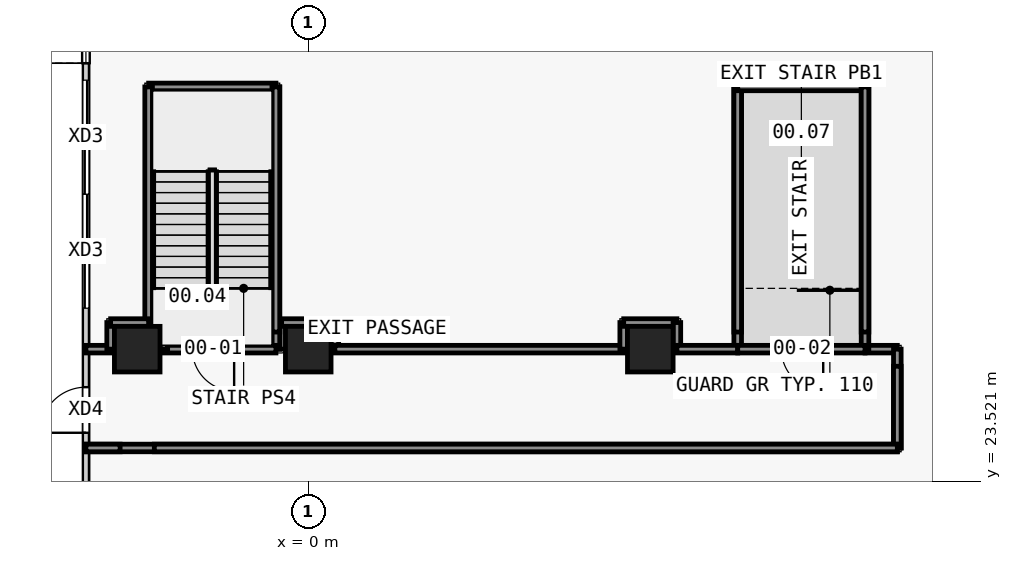
"""IFC4 building model, lengths in metres.
Left out: names, types, materials, properties, quantities, classifications, styles, units other than length and angle.
Written with IfcOpenShell. Run it as: python <this file> out.ifc"""

import sys

from ifc_helpers import new_model, si_unit, direction, frame, frame_2d, origin, origin_2d, place, context, subcontext, project, spatial, rectangle, extrude, element, fill, save


model = new_model("IFC4")
c1 = context("Model", 3, precision=1e-05, world=origin(), true_north=direction((0.0, 1.0)))
c2 = subcontext(c1, "Body", "Model", "MODEL_VIEW")
j1 = project(units=[si_unit("LENGTHUNIT", "METRE"), si_unit("PLANEANGLEUNIT", "RADIAN")], contexts=[c1])
p1 = place(None, origin())
s1 = spatial("IfcSite", under=j1, at=p1, CompositionType="ELEMENT")
p2 = place(p1, origin())
s2 = spatial("IfcBuilding", under=s1, at=p2, CompositionType="ELEMENT")
p3 = place(p2, origin())
s3 = spatial("IfcBuildingStorey", under=s2, at=p3, CompositionType="ELEMENT", Elevation=0.0)
for number, where, z_axis, x_axis in (
    (1, (-4.5, 27.0, 0.0), (0.0, 0.0, 1.0), (1.0, 0.0, 0.0)),
    (2, (0.0, 27.0, 0.0), (0.0, 0.0, 1.0), (1.0, 0.0, 0.0)),
    (3, (9.0, 27.0, 0.0), (0.0, 0.0, 1.0), (1.0, 0.0, 0.0)),
):
    element("IfcColumn", number, at=place(p3, frame(where, z_axis=z_axis, x_axis=x_axis)), inside=s3, PredefinedType="COLUMN", context=c2, shape_type="SweptSolid", body=[
        extrude(rectangle(XDim=1.2, YDim=1.2, at=origin_2d()), origin(), (0.0, 0.0, 1.0), 8.0),
    ])
p4 = place(p3, frame((-5.85, 21.13, 0.0), z_axis=(0.0, 0.0, 1.0), x_axis=(0.0, 1.0, 0.0)))
e4 = element("IfcWall", 4, at=p4, inside=s3, PredefinedType="STANDARD", context=c2, shape_type="SweptSolid", body=[
    extrude(rectangle(XDim=13.395, YDim=0.16, at=frame_2d((6.698, 0.0))), origin(), (0.0, 0.0, 1.0), 7.65),
])
p5 = place(p4, frame((6.948, 0.0, 0.0)))
e5 = element("IfcOpeningElement", 5, at=p5, cuts=e4, PredefinedType="OPENING", context=c2, shape_type="SweptSolid", body=[
    extrude(rectangle(XDim=3.0, YDim=3.0, at=frame_2d((1.5, 1.5))), frame((0.0, 0.09, 0.0), z_axis=(0.0, -1.0, 0.0), x_axis=(1.0, 0.0, 0.0)), (0.0, 0.0, 1.0), 0.18),
])
p6 = place(p4, frame((9.948, 0.0, 0.0)))
e6 = element("IfcOpeningElement", 6, at=p6, cuts=e4, PredefinedType="OPENING", context=c2, shape_type="SweptSolid", body=[
    extrude(rectangle(XDim=3.0, YDim=3.0, at=frame_2d((1.5, 1.5))), frame((0.0, 0.09, 0.0), z_axis=(0.0, -1.0, 0.0), x_axis=(1.0, 0.0, 0.0)), (0.0, 0.0, 1.0), 0.18),
])
p7 = place(p4, frame((3.67, 0.0, 0.0)))
e7 = element("IfcOpeningElement", 7, at=p7, cuts=e4, PredefinedType="OPENING", context=c2, shape_type="SweptSolid", body=[
    extrude(rectangle(XDim=1.2, YDim=2.4, at=frame_2d((0.6, 1.2))), frame((0.0, 0.09, 0.0), z_axis=(0.0, -1.0, 0.0), x_axis=(1.0, 0.0, 0.0)), (0.0, 0.0, 1.0), 0.18),
])
p8 = place(p3, frame((14.65, 27.0, 0.0), z_axis=(0.0, 0.0, 1.0), x_axis=(1.0, 0.0, 0.0)))
e8 = element("IfcWall", 8, at=p8, inside=s3, PredefinedType="PARTITIONING", context=c2, shape_type="SweptSolid", body=[
    extrude(rectangle(XDim=0.85, YDim=0.2, at=frame_2d((0.425, 0.0))), origin(), (0.0, 0.0, 1.0), 6.95),
])
p9 = place(p3, frame((15.5, 27.0, 0.0), z_axis=(0.0, 0.0, 1.0), x_axis=(0.0, -1.0, 0.0)))
e9 = element("IfcWall", 9, at=p9, inside=s3, PredefinedType="PARTITIONING", context=c2, shape_type="SweptSolid", body=[
    extrude(rectangle(XDim=2.6, YDim=0.2, at=frame_2d((1.3, 0.0))), origin(), (0.0, 0.0, 1.0), 6.95),
])
p10 = place(p3, frame((15.5, 24.4, 0.0), z_axis=(0.0, 0.0, 1.0), x_axis=(-1.0, 0.0, 0.0)))
e10 = element("IfcWall", 10, at=p10, inside=s3, PredefinedType="PARTITIONING", context=c2, shape_type="SweptSolid", body=[
    extrude(rectangle(XDim=21.35, YDim=0.2, at=frame_2d((10.675, 0.0))), origin(), (0.0, 0.0, 1.0), 6.95),
])
p11 = place(p3, frame((11.3, 27.0, 0.0), z_axis=(0.0, 0.0, 1.0), x_axis=(0.0, 1.0, 0.0)))
e11 = element("IfcWall", 11, at=p11, inside=s3, PredefinedType="PARTITIONING", context=c2, shape_type="SweptSolid", body=[
    extrude(rectangle(XDim=6.9, YDim=0.2, at=frame_2d((3.45, 0.0))), origin(), (0.0, 0.0, 1.0), 6.95),
])
p12 = place(p3, frame((11.3, 33.9, 0.0), z_axis=(0.0, 0.0, 1.0), x_axis=(1.0, 0.0, 0.0)))
e12 = element("IfcWall", 12, at=p12, inside=s3, PredefinedType="PARTITIONING", context=c2, shape_type="SweptSolid", body=[
    extrude(rectangle(XDim=3.35, YDim=0.2, at=frame_2d((1.675, 0.0))), origin(), (0.0, 0.0, 1.0), 7.65),
])
p13 = place(p3, frame((14.65, 33.9, 0.0), z_axis=(0.0, 0.0, 1.0), x_axis=(0.0, -1.0, 0.0)))
e13 = element("IfcWall", 13, at=p13, inside=s3, PredefinedType="PARTITIONING", context=c2, shape_type="SweptSolid", body=[
    extrude(rectangle(XDim=6.9, YDim=0.2, at=frame_2d((3.45, 0.0))), origin(), (0.0, 0.0, 1.0), 6.95),
])
p14 = place(p3, frame((-0.65, 27.0, 0.0), z_axis=(0.0, 0.0, 1.0), x_axis=(0.0, 1.0, 0.0)))
e14 = element("IfcWall", 14, at=p14, inside=s3, PredefinedType="PARTITIONING", context=c2, shape_type="SweptSolid", body=[
    extrude(rectangle(XDim=0.7, YDim=0.2, at=frame_2d((0.35, 0.0))), origin(), (0.0, 0.0, 1.0), 6.95),
])
p15 = place(p3, frame((-0.7, 27.7, 0.0), z_axis=(0.0, 0.0, 1.0), x_axis=(1.0, 0.0, 0.0)))
e15 = element("IfcWall", 15, at=p15, inside=s3, PredefinedType="PARTITIONING", context=c2, shape_type="SweptSolid", body=[
    extrude(rectangle(XDim=1.4, YDim=0.2, at=frame_2d((0.7, 0.0))), origin(), (0.0, 0.0, 1.0), 6.95),
])
p16 = place(p3, frame((0.7, 27.7, 0.0), z_axis=(0.0, 0.0, 1.0), x_axis=(0.0, -1.0, 0.0)))
e16 = element("IfcWall", 16, at=p16, inside=s3, PredefinedType="PARTITIONING", context=c2, shape_type="SweptSolid", body=[
    extrude(rectangle(XDim=0.7, YDim=0.2, at=frame_2d((0.35, 0.0))), origin(), (0.0, 0.0, 1.0), 6.95),
])
p17 = place(p3, frame((0.7, 27.0, 0.0), z_axis=(0.0, 0.0, 1.0), x_axis=(1.0, 0.0, 0.0)))
e17 = element("IfcWall", 17, at=p17, inside=s3, PredefinedType="PARTITIONING", context=c2, shape_type="SweptSolid", body=[
    extrude(rectangle(XDim=7.6, YDim=0.2, at=frame_2d((3.8, 0.0))), origin(), (0.0, 0.0, 1.0), 6.95),
])
p18 = place(p3, frame((8.3, 27.0, 0.0), z_axis=(0.0, 0.0, 1.0), x_axis=(0.0, 1.0, 0.0)))
e18 = element("IfcWall", 18, at=p18, inside=s3, PredefinedType="PARTITIONING", context=c2, shape_type="SweptSolid", body=[
    extrude(rectangle(XDim=0.7, YDim=0.2, at=frame_2d((0.35, 0.0))), origin(), (0.0, 0.0, 1.0), 6.95),
])
p19 = place(p3, frame((8.3, 27.7, 0.0), z_axis=(0.0, 0.0, 1.0), x_axis=(1.0, 0.0, 0.0)))
e19 = element("IfcWall", 19, at=p19, inside=s3, PredefinedType="PARTITIONING", context=c2, shape_type="SweptSolid", body=[
    extrude(rectangle(XDim=1.4, YDim=0.2, at=frame_2d((0.7, 0.0))), origin(), (0.0, 0.0, 1.0), 6.95),
])
p20 = place(p3, frame((9.7, 27.7, 0.0), z_axis=(0.0, 0.0, 1.0), x_axis=(0.0, -1.0, 0.0)))
e20 = element("IfcWall", 20, at=p20, inside=s3, PredefinedType="PARTITIONING", context=c2, shape_type="SweptSolid", body=[
    extrude(rectangle(XDim=0.7, YDim=0.2, at=frame_2d((0.35, 0.0))), origin(), (0.0, 0.0, 1.0), 6.95),
])
p21 = place(p3, frame((9.7, 27.0, 0.0), z_axis=(0.0, 0.0, 1.0), x_axis=(1.0, 0.0, 0.0)))
e21 = element("IfcWall", 21, at=p21, inside=s3, PredefinedType="PARTITIONING", context=c2, shape_type="SweptSolid", body=[
    extrude(rectangle(XDim=1.6, YDim=0.2, at=frame_2d((0.8, 0.0))), origin(), (0.0, 0.0, 1.0), 6.95),
])
p22 = place(p3, frame((-4.2, 33.9, 0.0), z_axis=(0.0, 0.0, 1.0), x_axis=(1.0, 0.0, 0.0)))
e22 = element("IfcWall", 22, at=p22, inside=s3, PredefinedType="PARTITIONING", context=c2, shape_type="SweptSolid", body=[
    extrude(rectangle(XDim=3.35, YDim=0.2, at=frame_2d((1.675, 0.0))), origin(), (0.0, 0.0, 1.0), 7.65),
])
p23 = place(p3, frame((-0.85, 33.9, 0.0), z_axis=(0.0, 0.0, 1.0), x_axis=(0.0, -1.0, 0.0)))
e23 = element("IfcWall", 23, at=p23, inside=s3, PredefinedType="PARTITIONING", context=c2, shape_type="SweptSolid", body=[
    extrude(rectangle(XDim=6.9, YDim=0.2, at=frame_2d((3.45, 0.0))), origin(), (0.0, 0.0, 1.0), 6.95),
])
p24 = place(p3, frame((-4.2, 27.7, 0.0), z_axis=(0.0, 0.0, 1.0), x_axis=(0.0, 1.0, 0.0)))
e24 = element("IfcWall", 24, at=p24, inside=s3, PredefinedType="PARTITIONING", context=c2, shape_type="SweptSolid", body=[
    extrude(rectangle(XDim=6.2, YDim=0.2, at=frame_2d((3.1, 0.0))), origin(), (0.0, 0.0, 1.0), 7.65),
])
p25 = place(p3, frame((-0.85, 27.0, 0.0), z_axis=(0.0, 0.0, 1.0), x_axis=(-1.0, 0.0, 0.0)))
e25 = element("IfcWall", 25, at=p25, inside=s3, PredefinedType="PARTITIONING", context=c2, shape_type="SweptSolid", body=[
    extrude(rectangle(XDim=2.95, YDim=0.2, at=frame_2d((1.475, 0.0))), origin(), (0.0, 0.0, 1.0), 6.95),
])
p26 = place(p25, frame((1.1, 0.0, 0.0)))
e26 = element("IfcOpeningElement", 26, at=p26, cuts=e25, PredefinedType="OPENING", context=c2, shape_type="SweptSolid", body=[
    extrude(rectangle(XDim=1.1, YDim=2.1, at=frame_2d((0.55, 1.05))), frame((0.0, 0.11, 0.0), z_axis=(0.0, -1.0, 0.0), x_axis=(1.0, 0.0, 0.0)), (0.0, 0.0, 1.0), 0.22),
])
p27 = place(p3, frame((-3.8, 27.0, 0.0), z_axis=(0.0, 0.0, 1.0), x_axis=(0.0, 1.0, 0.0)))
e27 = element("IfcWall", 27, at=p27, inside=s3, PredefinedType="PARTITIONING", context=c2, shape_type="SweptSolid", body=[
    extrude(rectangle(XDim=0.7, YDim=0.2, at=frame_2d((0.35, 0.0))), origin(), (0.0, 0.0, 1.0), 6.95),
])
p28 = place(p3, frame((14.65, 27.0, 0.0), z_axis=(0.0, 0.0, 1.0), x_axis=(-1.0, 0.0, 0.0)))
e28 = element("IfcWall", 28, at=p28, inside=s3, PredefinedType="PARTITIONING", context=c2, shape_type="SweptSolid", body=[
    extrude(rectangle(XDim=3.35, YDim=0.2, at=frame_2d((1.675, 0.0))), origin(), (0.0, 0.0, 1.0), 6.95),
])
p29 = place(p28, frame((1.1, 0.0, 0.0)))
e29 = element("IfcOpeningElement", 29, at=p29, cuts=e28, PredefinedType="OPENING", context=c2, shape_type="SweptSolid", body=[
    extrude(rectangle(XDim=1.1, YDim=2.1, at=frame_2d((0.55, 1.05))), frame((0.0, 0.11, 0.0), z_axis=(0.0, -1.0, 0.0), x_axis=(1.0, 0.0, 0.0)), (0.0, 0.0, 1.0), 0.22),
])
p30 = place(p3, frame((-5.85, 27.0, 0.0), z_axis=(0.0, 0.0, 1.0), x_axis=(1.0, 0.0, 0.0)))
e30 = element("IfcWall", 30, at=p30, inside=s3, PredefinedType="PARTITIONING", context=c2, shape_type="SweptSolid", body=[
    extrude(rectangle(XDim=0.65, YDim=0.2, at=frame_2d((0.325, 0.0))), origin(), (0.0, 0.0, 1.0), 7.65),
])
p31 = place(p3, frame((-5.2, 27.0, 0.0), z_axis=(0.0, 0.0, 1.0), x_axis=(0.0, 1.0, 0.0)))
e31 = element("IfcWall", 31, at=p31, inside=s3, PredefinedType="PARTITIONING", context=c2, shape_type="SweptSolid", body=[
    extrude(rectangle(XDim=0.7, YDim=0.2, at=frame_2d((0.35, 0.0))), origin(), (0.0, 0.0, 1.0), 7.65),
])
p32 = place(p3, frame((-5.2, 27.7, 0.0), z_axis=(0.0, 0.0, 1.0), x_axis=(1.0, 0.0, 0.0)))
e32 = element("IfcWall", 32, at=p32, inside=s3, PredefinedType="PARTITIONING", context=c2, shape_type="SweptSolid", body=[
    extrude(rectangle(XDim=1.0, YDim=0.2, at=frame_2d((0.5, 0.0))), origin(), (0.0, 0.0, 1.0), 7.65),
])
p33 = place(p3, frame((15.5, 26.55, 6.95), z_axis=(0.0, 0.0, 1.0), x_axis=(0.0, -1.0, 0.0)))
e33 = element("IfcWall", 33, at=p33, inside=s3, PredefinedType="PARTITIONING", context=c2, shape_type="SweptSolid", body=[
    extrude(rectangle(XDim=2.15, YDim=0.2, at=frame_2d((1.075, 0.0))), origin(), (0.0, 0.0, 1.0), 0.7),
])
p34 = place(p3, frame((15.5, 24.4, 6.95), z_axis=(0.0, 0.0, 1.0), x_axis=(-1.0, 0.0, 0.0)))
e34 = element("IfcWall", 34, at=p34, inside=s3, PredefinedType="PARTITIONING", context=c2, shape_type="SweptSolid", body=[
    extrude(rectangle(XDim=19.55, YDim=0.2, at=frame_2d((9.775, 0.0))), origin(), (0.0, 0.0, 1.0), 0.7),
])
p35 = place(p3, frame((-4.95, 24.4, 6.95), z_axis=(0.0, 0.0, 1.0), x_axis=(-1.0, 0.0, 0.0)))
e35 = element("IfcWall", 35, at=p35, inside=s3, PredefinedType="PARTITIONING", context=c2, shape_type="SweptSolid", body=[
    extrude(rectangle(XDim=0.9, YDim=0.2, at=frame_2d((0.45, 0.0))), origin(), (0.0, 0.0, 1.0), 0.7),
])
for number, where, z_axis, x_axis in (
    (36, (11.3, 27.45, 6.95), (0.0, 0.0, 1.0), (0.0, 1.0, 0.0)),
    (37, (14.65, 33.9, 6.95), (0.0, 0.0, 1.0), (0.0, -1.0, 0.0)),
    (38, (-0.85, 33.9, 6.95), (0.0, 0.0, 1.0), (0.0, -1.0, 0.0)),
):
    element("IfcWall", number, at=place(p3, frame(where, z_axis=z_axis, x_axis=x_axis)), inside=s3, PredefinedType="PARTITIONING", context=c2, shape_type="SweptSolid", body=[
        extrude(rectangle(XDim=6.45, YDim=0.2, at=frame_2d((3.225, 0.0))), origin(), (0.0, 0.0, 1.0), 0.7),
    ])
p36 = place(p5, origin())
e39 = element("IfcDoor", 39, at=p36, inside=s3, OperationType="SINGLE_SWING_LEFT", PredefinedType="DOOR", context=c2, shape_type="SweptSolid", body=[
    extrude(rectangle(XDim=3.0, YDim=3.0, at=frame_2d((1.5, 1.5))), frame((0.0, 0.025, 0.0), z_axis=(0.0, -1.0, 0.0), x_axis=(1.0, 0.0, 0.0)), (0.0, 0.0, 1.0), 0.05),
])
fill(e5, e39)
p37 = place(p6, origin())
e40 = element("IfcDoor", 40, at=p37, inside=s3, OperationType="SINGLE_SWING_LEFT", PredefinedType="DOOR", context=c2, shape_type="SweptSolid", body=[
    extrude(rectangle(XDim=3.0, YDim=3.0, at=frame_2d((1.5, 1.5))), frame((0.0, 0.025, 0.0), z_axis=(0.0, -1.0, 0.0), x_axis=(1.0, 0.0, 0.0)), (0.0, 0.0, 1.0), 0.05),
])
fill(e6, e40)
p38 = place(p7, origin())
e41 = element("IfcDoor", 41, at=p38, inside=s3, OperationType="SINGLE_SWING_LEFT", PredefinedType="DOOR", context=c2, shape_type="SweptSolid", body=[
    extrude(rectangle(XDim=1.2, YDim=2.4, at=frame_2d((0.6, 1.2))), frame((0.0, 0.025, 0.0), z_axis=(0.0, -1.0, 0.0), x_axis=(1.0, 0.0, 0.0)), (0.0, 0.0, 1.0), 0.05),
])
fill(e7, e41)
p39 = place(p26, origin())
e42 = element("IfcDoor", 42, at=p39, inside=s3, OperationType="SINGLE_SWING_LEFT", PredefinedType="DOOR", context=c2, shape_type="SweptSolid", body=[
    extrude(rectangle(XDim=1.1, YDim=2.1, at=frame_2d((0.55, 1.05))), frame((0.0, 0.025, 0.0), z_axis=(0.0, -1.0, 0.0), x_axis=(1.0, 0.0, 0.0)), (0.0, 0.0, 1.0), 0.05),
])
fill(e26, e42)
p40 = place(p29, origin())
e43 = element("IfcDoor", 43, at=p40, inside=s3, OperationType="SINGLE_SWING_LEFT", PredefinedType="DOOR", context=c2, shape_type="SweptSolid", body=[
    extrude(rectangle(XDim=1.1, YDim=2.1, at=frame_2d((0.55, 1.05))), frame((0.0, 0.025, 0.0), z_axis=(0.0, -1.0, 0.0), x_axis=(1.0, 0.0, 0.0)), (0.0, 0.0, 1.0), 0.05),
])
fill(e29, e43)
save(model, sys.argv[1])
